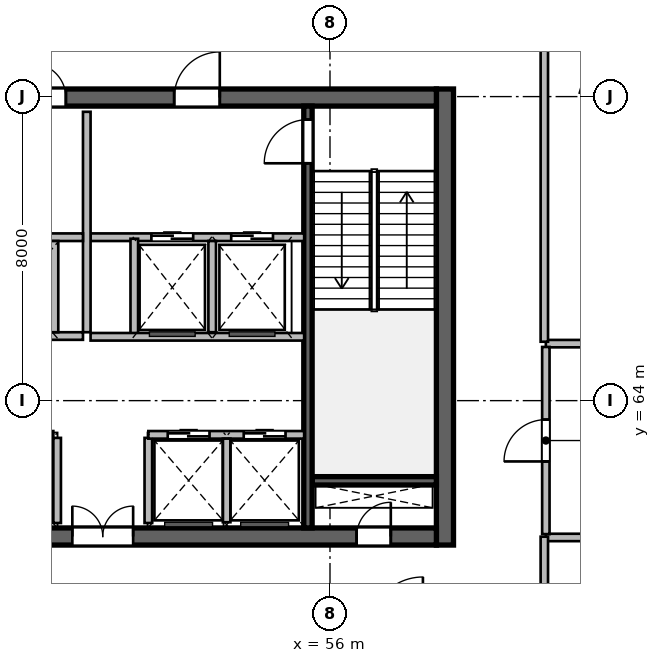
"""IFC4 building model, lengths in metres.
Left out: names, types, materials, properties, quantities, classifications, styles, units other than length and angle.
Written with IfcOpenShell. Run it as: python <this file> out.ifc"""

import sys

from ifc_helpers import new_model, si_unit, direction, frame, frame_2d, origin, place, context, subcontext, project, spatial, rectangle, extrude, source, transform, mapped, element, fill, save


model = new_model("IFC4")
c1 = context("Model", 3, precision=1e-05, world=origin(), true_north=direction((0.0, 1.0)))
c2 = subcontext(c1, "Body", "Model", "MODEL_VIEW")
j1 = project(units=[si_unit("LENGTHUNIT", "METRE"), si_unit("PLANEANGLEUNIT", "RADIAN")], contexts=[c1])
p1 = place(None, origin())
s1 = spatial("IfcSite", under=j1, at=p1, CompositionType="ELEMENT")
p2 = place(p1, origin())
s2 = spatial("IfcBuilding", under=s1, at=p2, CompositionType="ELEMENT")
p3 = place(p2, frame((0.0, 0.0, 199.2)))
s3 = spatial("IfcBuildingStorey", under=s2, at=p3, CompositionType="ELEMENT", Elevation=199.2)
m1 = source(origin(), c2, "Body", "SweptSolid", [
    extrude(rectangle(XDim=12.0, YDim=0.45, at=frame_2d((6.0, 0.0))), origin(), (0.0, 0.0, 1.0), 4.8),
])
p4 = place(p3, frame((59.025, 60.2, 0.0), z_axis=(0.0, 0.0, 1.0), x_axis=(0.0, 1.0, 0.0)))
e1 = element("IfcWall", 1, at=p4, inside=s3, PredefinedType="SHEAR", context=c2, shape_type="MappedRepresentation", body=[
    mapped(m1, transform((0.0, 0.0, 0.0), scale=1.0)),
])
m2 = source(origin(), c2, "Body", "SweptSolid", [
    extrude(rectangle(XDim=21.6, YDim=0.45, at=frame_2d((10.8, 0.0))), origin(), (0.0, 0.0, 1.0), 4.8),
])
p5 = place(p3, frame((37.2, 60.425, 0.0), z_axis=(0.0, 0.0, 1.0), x_axis=(1.0, 0.0, 0.0)))
e2 = element("IfcWall", 2, at=p5, inside=s3, PredefinedType="SHEAR", context=c2, shape_type="MappedRepresentation", body=[
    mapped(m2, transform((0.0, 0.0, 0.0), scale=1.0)),
])
p6 = place(p5, frame((1.1, 0.0, 0.0)))
e3 = element("IfcOpeningElement", 3, at=p6, cuts=e2, PredefinedType="OPENING", context=c2, shape_type="SweptSolid", body=[
    extrude(rectangle(XDim=1.15, YDim=2.15, at=frame_2d((0.575, 1.075))), frame((0.0, 0.235, 0.0), z_axis=(0.0, -1.0, 0.0), x_axis=(1.0, 0.0, 0.0)), (0.0, 0.0, 1.0), 0.47),
])
p7 = place(p5, frame((19.5, 0.0, 0.0)))
e4 = element("IfcOpeningElement", 4, at=p7, cuts=e2, PredefinedType="OPENING", context=c2, shape_type="SweptSolid", body=[
    extrude(rectangle(XDim=0.9, YDim=2.1, at=frame_2d((0.45, 1.05))), frame((0.0, 0.235, 0.0), z_axis=(0.0, -1.0, 0.0), x_axis=(1.0, 0.0, 0.0)), (0.0, 0.0, 1.0), 0.47),
])
p8 = place(p5, frame((12.02, 0.0, 0.0)))
e5 = element("IfcOpeningElement", 5, at=p8, cuts=e2, PredefinedType="OPENING", context=c2, shape_type="SweptSolid", body=[
    extrude(rectangle(XDim=1.6, YDim=2.15, at=frame_2d((0.8, 1.075))), frame((0.0, 0.235, 0.0), z_axis=(0.0, -1.0, 0.0), x_axis=(1.0, 0.0, 0.0)), (0.0, 0.0, 1.0), 0.47),
])
p9 = place(p3, frame((37.2, 71.975, 0.0), z_axis=(0.0, 0.0, 1.0), x_axis=(1.0, 0.0, 0.0)))
e6 = element("IfcWall", 6, at=p9, inside=s3, PredefinedType="SHEAR", context=c2, shape_type="MappedRepresentation", body=[
    mapped(m2, transform((0.0, 0.0, 0.0), scale=1.0)),
])
p10 = place(p9, frame((1.2, 0.0, 0.0)))
e7 = element("IfcOpeningElement", 7, at=p10, cuts=e6, PredefinedType="OPENING", context=c2, shape_type="SweptSolid", body=[
    extrude(rectangle(XDim=0.9, YDim=2.1, at=frame_2d((0.45, 1.05))), frame((0.0, 0.235, 0.0), z_axis=(0.0, -1.0, 0.0), x_axis=(1.0, 0.0, 0.0)), (0.0, 0.0, 1.0), 0.47),
])
p11 = place(p9, frame((14.7, 0.0, 0.0)))
e8 = element("IfcOpeningElement", 8, at=p11, cuts=e6, PredefinedType="OPENING", context=c2, shape_type="SweptSolid", body=[
    extrude(rectangle(XDim=1.2, YDim=2.15, at=frame_2d((0.6, 1.075))), frame((0.0, 0.235, 0.0), z_axis=(0.0, -1.0, 0.0), x_axis=(1.0, 0.0, 0.0)), (0.0, 0.0, 1.0), 0.47),
])
p12 = place(p9, frame((4.15, 0.0, 0.0)))
e9 = element("IfcOpeningElement", 9, at=p12, cuts=e6, PredefinedType="OPENING", context=c2, shape_type="SweptSolid", body=[
    extrude(rectangle(XDim=1.3, YDim=2.15, at=frame_2d((0.65, 1.075))), frame((0.0, 0.235, 0.0), z_axis=(0.0, -1.0, 0.0), x_axis=(1.0, 0.0, 0.0)), (0.0, 0.0, 1.0), 0.47),
])
p13 = place(p9, frame((7.25, 0.0, 0.0)))
e10 = element("IfcOpeningElement", 10, at=p13, cuts=e6, PredefinedType="OPENING", context=c2, shape_type="SweptSolid", body=[
    extrude(rectangle(XDim=0.9, YDim=2.1, at=frame_2d((0.45, 1.05))), frame((0.0, 0.235, 0.0), z_axis=(0.0, -1.0, 0.0), x_axis=(1.0, 0.0, 0.0)), (0.0, 0.0, 1.0), 0.47),
])
p14 = place(p9, frame((10.95, 0.0, 0.0)))
e11 = element("IfcOpeningElement", 11, at=p14, cuts=e6, PredefinedType="OPENING", context=c2, shape_type="SweptSolid", body=[
    extrude(rectangle(XDim=0.9, YDim=2.1, at=frame_2d((0.45, 1.05))), frame((0.0, 0.235, 0.0), z_axis=(0.0, -1.0, 0.0), x_axis=(1.0, 0.0, 0.0)), (0.0, 0.0, 1.0), 0.47),
])
m3 = source(origin(), c2, "Body", "SweptSolid", [
    extrude(rectangle(XDim=3.27, YDim=0.22, at=frame_2d((1.635, 0.0))), origin(), (0.0, 0.0, 1.0), 4.8),
])
p15 = place(p3, frame((55.53, 61.89, 0.0), z_axis=(0.0, 0.0, 1.0), x_axis=(1.0, 0.0, 0.0)))
e12 = element("IfcWall", 12, at=p15, inside=s3, PredefinedType="SHEAR", context=c2, shape_type="MappedRepresentation", body=[
    mapped(m3, transform((0.0, 0.0, 0.0), scale=1.0)),
])
m4 = source(origin(), c2, "Body", "SweptSolid", [
    extrude(rectangle(XDim=11.1, YDim=0.22, at=frame_2d((5.55, 0.0))), origin(), (0.0, 0.0, 1.0), 4.8),
])
p16 = place(p3, frame((55.42, 60.65, 0.0), z_axis=(0.0, 0.0, 1.0), x_axis=(0.0, 1.0, 0.0)))
e13 = element("IfcWall", 13, at=p16, inside=s3, PredefinedType="SHEAR", context=c2, shape_type="MappedRepresentation", body=[
    mapped(m4, transform((0.0, 0.0, 0.0), scale=1.0)),
])
p17 = place(p16, frame((9.595, 0.0, 0.0)))
e14 = element("IfcOpeningElement", 14, at=p17, cuts=e13, PredefinedType="OPENING", context=c2, shape_type="SweptSolid", body=[
    extrude(rectangle(XDim=1.15, YDim=2.15, at=frame_2d((0.575, 1.075))), frame((0.0, 0.12, 0.0), z_axis=(0.0, -1.0, 0.0), x_axis=(1.0, 0.0, 0.0)), (0.0, 0.0, 1.0), 0.24),
])
m5 = source(origin(), c2, "Body", "SweptSolid", [
    extrude(rectangle(XDim=2.24, YDim=0.2, at=frame_2d((1.12, 0.0))), origin(), (0.0, 0.0, 1.0), 4.54),
])
for number, where, z_axis, x_axis in (
    (15, (48.82, 60.78, 0.0), (0.0, 0.0, 1.0), (0.0, 1.0, 0.0)),
    (16, (51.22, 60.78, 0.0), (0.0, 0.0, 1.0), (0.0, 1.0, 0.0)),
):
    element("IfcWall", number, at=place(p3, frame(where, z_axis=z_axis, x_axis=x_axis)), inside=s3, PredefinedType="SOLIDWALL", context=c2, shape_type="MappedRepresentation", body=[
        mapped(m5, transform((0.0, 0.0, 0.0), scale=1.0)),
    ])
m6 = source(origin(), c2, "Body", "SweptSolid", [
    extrude(rectangle(XDim=5.62, YDim=0.2, at=frame_2d((2.81, 0.0))), origin(), (0.0, 0.0, 1.0), 4.54),
])
p18 = place(p3, frame((49.7, 68.3, 0.0), z_axis=(0.0, 0.0, 1.0), x_axis=(1.0, 0.0, 0.0)))
e17 = element("IfcWall", 17, at=p18, inside=s3, PredefinedType="SOLIDWALL", context=c2, shape_type="MappedRepresentation", body=[
    mapped(m6, transform((0.0, 0.0, 0.0), scale=1.0)),
])
p19 = place(p18, frame((1.6, 0.0, 0.0)))
e18 = element("IfcOpeningElement", 18, at=p19, cuts=e17, PredefinedType="OPENING", context=c2, shape_type="SweptSolid", body=[
    extrude(rectangle(XDim=1.1, YDim=2.15, at=frame_2d((0.55, 1.075))), frame((0.0, 0.11, 0.0), z_axis=(0.0, -1.0, 0.0), x_axis=(1.0, 0.0, 0.0)), (0.0, 0.0, 1.0), 0.22),
])
p20 = place(p18, frame((3.7, 0.0, 0.0)))
e19 = element("IfcOpeningElement", 19, at=p20, cuts=e17, PredefinedType="OPENING", context=c2, shape_type="SweptSolid", body=[
    extrude(rectangle(XDim=1.1, YDim=2.15, at=frame_2d((0.55, 1.075))), frame((0.0, 0.11, 0.0), z_axis=(0.0, -1.0, 0.0), x_axis=(1.0, 0.0, 0.0)), (0.0, 0.0, 1.0), 0.22),
])
m7 = source(origin(), c2, "Body", "SweptSolid", [
    extrude(rectangle(XDim=5.8, YDim=0.2, at=frame_2d((2.9, 0.0))), origin(), (0.0, 0.0, 1.0), 4.54),
])
p21 = place(p3, frame((49.6, 65.8, 0.0), z_axis=(0.0, 0.0, 1.0), x_axis=(0.0, 1.0, 0.0)))
e20 = element("IfcWall", 20, at=p21, inside=s3, PredefinedType="SOLIDWALL", context=c2, shape_type="MappedRepresentation", body=[
    mapped(m7, transform((0.0, 0.0, 0.0), scale=1.0)),
])
m8 = source(origin(), c2, "Body", "SweptSolid", [
    extrude(rectangle(XDim=2.58, YDim=0.2, at=frame_2d((1.29, 0.0))), origin(), (0.0, 0.0, 1.0), 4.54),
])
p22 = place(p3, frame((50.85, 65.68, 0.0), z_axis=(0.0, 0.0, 1.0), x_axis=(0.0, 1.0, 0.0)))
e21 = element("IfcWall", 21, at=p22, inside=s3, PredefinedType="SOLIDWALL", context=c2, shape_type="MappedRepresentation", body=[
    mapped(m8, transform((0.0, 0.0, 0.0), scale=1.0)),
])
m9 = source(origin(), c2, "Body", "SweptSolid", [
    extrude(rectangle(XDim=2.4, YDim=0.2, at=frame_2d((1.2, 0.0))), origin(), (0.0, 0.0, 1.0), 4.54),
])
p23 = place(p3, frame((52.9, 65.8, 0.0), z_axis=(0.0, 0.0, 1.0), x_axis=(0.0, 1.0, 0.0)))
e22 = element("IfcWall", 22, at=p23, inside=s3, PredefinedType="SOLIDWALL", context=c2, shape_type="MappedRepresentation", body=[
    mapped(m9, transform((0.0, 0.0, 0.0), scale=1.0)),
])
p24 = place(p3, frame((49.7, 65.68, 0.0), z_axis=(0.0, 0.0, 1.0), x_axis=(1.0, 0.0, 0.0)))
e23 = element("IfcWall", 23, at=p24, inside=s3, PredefinedType="SOLIDWALL", context=c2, shape_type="MappedRepresentation", body=[
    mapped(m6, transform((0.0, 0.0, 0.0), scale=1.0)),
])
m10 = source(origin(), c2, "Body", "SweptSolid", [
    extrude(rectangle(XDim=8.8, YDim=0.2, at=frame_2d((4.4, 0.0))), origin(), (0.0, 0.0, 1.0), 4.54),
])
p25 = place(p3, frame((40.7, 68.3, 0.0), z_axis=(0.0, 0.0, 1.0), x_axis=(1.0, 0.0, 0.0)))
e24 = element("IfcWall", 24, at=p25, inside=s3, PredefinedType="SOLIDWALL", context=c2, shape_type="MappedRepresentation", body=[
    mapped(m10, transform((0.0, 0.0, 0.0), scale=1.0)),
])
m11 = source(origin(), c2, "Body", "SweptSolid", [
    extrude(rectangle(XDim=8.02, YDim=0.2, at=frame_2d((4.01, 0.0))), origin(), (0.0, 0.0, 1.0), 4.54),
])
p26 = place(p3, frame((40.7, 63.1, 0.0), z_axis=(0.0, 0.0, 1.0), x_axis=(1.0, 0.0, 0.0)))
e25 = element("IfcWall", 25, at=p26, inside=s3, PredefinedType="SOLIDWALL", context=c2, shape_type="MappedRepresentation", body=[
    mapped(m11, transform((0.0, 0.0, 0.0), scale=1.0)),
])
p27 = place(p26, frame((0.72, 0.0, 0.0)))
e26 = element("IfcOpeningElement", 26, at=p27, cuts=e25, PredefinedType="OPENING", context=c2, shape_type="SweptSolid", body=[
    extrude(rectangle(XDim=1.0, YDim=2.15, at=frame_2d((0.5, 1.075))), frame((0.0, 0.11, 0.0), z_axis=(0.0, -1.0, 0.0), x_axis=(1.0, 0.0, 0.0)), (0.0, 0.0, 1.0), 0.22),
])
p28 = place(p26, frame((2.62, 0.0, 0.0)))
e27 = element("IfcOpeningElement", 27, at=p28, cuts=e25, PredefinedType="OPENING", context=c2, shape_type="SweptSolid", body=[
    extrude(rectangle(XDim=1.0, YDim=2.15, at=frame_2d((0.5, 1.075))), frame((0.0, 0.11, 0.0), z_axis=(0.0, -1.0, 0.0), x_axis=(1.0, 0.0, 0.0)), (0.0, 0.0, 1.0), 0.22),
])
p29 = place(p26, frame((4.55, 0.0, 0.0)))
e28 = element("IfcOpeningElement", 28, at=p29, cuts=e25, PredefinedType="OPENING", context=c2, shape_type="SweptSolid", body=[
    extrude(rectangle(XDim=1.0, YDim=2.15, at=frame_2d((0.5, 1.075))), frame((0.0, 0.11, 0.0), z_axis=(0.0, -1.0, 0.0), x_axis=(1.0, 0.0, 0.0)), (0.0, 0.0, 1.0), 0.22),
])
p30 = place(p26, frame((6.55, 0.0, 0.0)))
e29 = element("IfcOpeningElement", 29, at=p30, cuts=e25, PredefinedType="OPENING", context=c2, shape_type="SweptSolid", body=[
    extrude(rectangle(XDim=1.0, YDim=2.15, at=frame_2d((0.5, 1.075))), frame((0.0, 0.11, 0.0), z_axis=(0.0, -1.0, 0.0), x_axis=(1.0, 0.0, 0.0)), (0.0, 0.0, 1.0), 0.22),
])
m12 = source(origin(), c2, "Body", "SweptSolid", [
    extrude(rectangle(XDim=4.1, YDim=0.2, at=frame_2d((2.05, 0.0))), origin(), (0.0, 0.0, 1.0), 4.54),
])
p31 = place(p3, frame((51.22, 63.1, 0.0), z_axis=(0.0, 0.0, 1.0), x_axis=(1.0, 0.0, 0.0)))
e30 = element("IfcWall", 30, at=p31, inside=s3, PredefinedType="SOLIDWALL", context=c2, shape_type="MappedRepresentation", body=[
    mapped(m12, transform((0.0, 0.0, 0.0), scale=1.0)),
])
p32 = place(p31, frame((0.51, 0.0, 0.0)))
e31 = element("IfcOpeningElement", 31, at=p32, cuts=e30, PredefinedType="OPENING", context=c2, shape_type="SweptSolid", body=[
    extrude(rectangle(XDim=1.1, YDim=2.15, at=frame_2d((0.55, 1.075))), frame((0.0, 0.11, 0.0), z_axis=(0.0, -1.0, 0.0), x_axis=(1.0, 0.0, 0.0)), (0.0, 0.0, 1.0), 0.22),
])
p33 = place(p31, frame((2.51, 0.0, 0.0)))
e32 = element("IfcOpeningElement", 32, at=p33, cuts=e30, PredefinedType="OPENING", context=c2, shape_type="SweptSolid", body=[
    extrude(rectangle(XDim=1.1, YDim=2.15, at=frame_2d((0.55, 1.075))), frame((0.0, 0.11, 0.0), z_axis=(0.0, -1.0, 0.0), x_axis=(1.0, 0.0, 0.0)), (0.0, 0.0, 1.0), 0.22),
])
m13 = source(origin(), c2, "Body", "SweptSolid", [
    extrude(rectangle(XDim=2.2, YDim=0.2, at=frame_2d((1.1, 0.0))), origin(), (0.0, 0.0, 1.0), 4.54),
])
p34 = place(p3, frame((53.28, 60.8, 0.0), z_axis=(0.0, 0.0, 1.0), x_axis=(0.0, 1.0, 0.0)))
e33 = element("IfcWall", 33, at=p34, inside=s3, PredefinedType="SOLIDWALL", context=c2, shape_type="MappedRepresentation", body=[
    mapped(m13, transform((0.0, 0.0, 0.0), scale=1.0)),
])
p35 = place(p3, frame((40.7, 65.7, 0.0), z_axis=(0.0, 0.0, 1.0), x_axis=(1.0, 0.0, 0.0)))
e34 = element("IfcWall", 34, at=p35, inside=s3, PredefinedType="SOLIDWALL", context=c2, shape_type="MappedRepresentation", body=[
    mapped(m10, transform((0.0, 0.0, 0.0), scale=1.0)),
])
p36 = place(p35, frame((0.72, 0.0, 0.0)))
e35 = element("IfcOpeningElement", 35, at=p36, cuts=e34, PredefinedType="OPENING", context=c2, shape_type="SweptSolid", body=[
    extrude(rectangle(XDim=1.0, YDim=2.15, at=frame_2d((0.5, 1.075))), frame((0.0, 0.11, 0.0), z_axis=(0.0, -1.0, 0.0), x_axis=(1.0, 0.0, 0.0)), (0.0, 0.0, 1.0), 0.22),
])
p37 = place(p35, frame((2.62, 0.0, 0.0)))
e36 = element("IfcOpeningElement", 36, at=p37, cuts=e34, PredefinedType="OPENING", context=c2, shape_type="SweptSolid", body=[
    extrude(rectangle(XDim=1.0, YDim=2.15, at=frame_2d((0.5, 1.075))), frame((0.0, 0.11, 0.0), z_axis=(0.0, -1.0, 0.0), x_axis=(1.0, 0.0, 0.0)), (0.0, 0.0, 1.0), 0.22),
])
p38 = place(p35, frame((4.55, 0.0, 0.0)))
e37 = element("IfcOpeningElement", 37, at=p38, cuts=e34, PredefinedType="OPENING", context=c2, shape_type="SweptSolid", body=[
    extrude(rectangle(XDim=1.0, YDim=2.15, at=frame_2d((0.5, 1.075))), frame((0.0, 0.11, 0.0), z_axis=(0.0, -1.0, 0.0), x_axis=(1.0, 0.0, 0.0)), (0.0, 0.0, 1.0), 0.22),
])
p39 = place(p35, frame((6.55, 0.0, 0.0)))
e38 = element("IfcOpeningElement", 38, at=p39, cuts=e34, PredefinedType="OPENING", context=c2, shape_type="SweptSolid", body=[
    extrude(rectangle(XDim=1.0, YDim=2.15, at=frame_2d((0.5, 1.075))), frame((0.0, 0.11, 0.0), z_axis=(0.0, -1.0, 0.0), x_axis=(1.0, 0.0, 0.0)), (0.0, 0.0, 1.0), 0.22),
])
p40 = place(p3, frame((48.75, 65.8, 0.0), z_axis=(0.0, 0.0, 1.0), x_axis=(0.0, 1.0, 0.0)))
e39 = element("IfcWall", 39, at=p40, inside=s3, PredefinedType="SOLIDWALL", context=c2, shape_type="MappedRepresentation", body=[
    mapped(m9, transform((0.0, 0.0, 0.0), scale=1.0)),
])
m14 = source(origin(), c2, "Body", "SweptSolid", [
    extrude(rectangle(XDim=6.82, YDim=0.195, at=frame_2d((3.41, 0.0))), origin(), (0.0, 0.0, 1.0), 4.54),
])
for number, where, z_axis, x_axis in (
    (40, (61.68, 60.4, 0.0), (0.0, 0.0, 1.0), (1.0, 0.0, 0.0)),
    (41, (61.68, 65.5, 0.0), (0.0, 0.0, 1.0), (1.0, 0.0, 0.0)),
):
    element("IfcWall", number, at=place(p3, frame(where, z_axis=z_axis, x_axis=x_axis)), inside=s3, PredefinedType="PARTITIONING", context=c2, shape_type="MappedRepresentation", body=[
        mapped(m14, transform((0.0, 0.0, 0.0), scale=1.0)),
    ])
m15 = source(origin(), c2, "Body", "SweptSolid", [
    extrude(rectangle(XDim=4.925, YDim=0.195, at=frame_2d((2.462, 0.0))), origin(), (0.0, 0.0, 1.0), 4.54),
])
p41 = place(p3, frame((61.68, 60.488, 0.0), z_axis=(0.0, 0.0, 1.0), x_axis=(0.0, 1.0, 0.0)))
e42 = element("IfcWall", 42, at=p41, inside=s3, PredefinedType="PARTITIONING", context=c2, shape_type="MappedRepresentation", body=[
    mapped(m15, transform((0.0, 0.0, 0.0), scale=1.0)),
])
p42 = place(p41, frame((1.912, 0.0, 0.0)))
e43 = element("IfcOpeningElement", 43, at=p42, cuts=e42, PredefinedType="OPENING", context=c2, shape_type="SweptSolid", body=[
    extrude(rectangle(XDim=1.1, YDim=2.15, at=frame_2d((0.55, 1.075))), frame((0.0, 0.107, 0.0), z_axis=(0.0, -1.0, 0.0), x_axis=(1.0, 0.0, 0.0)), (0.0, 0.0, 1.0), 0.215),
])
m16 = source(origin(), c2, "Body", "SweptSolid", [
    extrude(rectangle(XDim=2.46, YDim=0.195, at=frame_2d((1.23, 0.0))), origin(), (0.0, 0.0, 1.0), 4.54),
])
p43 = place(p3, frame((61.64, 57.96, 0.0), z_axis=(0.0, 0.0, 1.0), x_axis=(0.0, 1.0, 0.0)))
e44 = element("IfcWall", 44, at=p43, inside=s3, PredefinedType="PARTITIONING", context=c2, shape_type="MappedRepresentation", body=[
    mapped(m16, transform((0.0, 0.0, 0.0), scale=1.0)),
])
m17 = source(origin(), c2, "Body", "SweptSolid", [
    extrude(rectangle(XDim=11.619, YDim=0.195, at=frame_2d((5.809, 0.0))), origin(), (0.0, 0.0, 1.0), 4.54),
])
p44 = place(p3, frame((61.64, 65.55, 0.0), z_axis=(0.0, 0.0, 1.0), x_axis=(0.0, 1.0, 0.0)))
e45 = element("IfcWall", 45, at=p44, inside=s3, PredefinedType="PARTITIONING", context=c2, shape_type="MappedRepresentation", body=[
    mapped(m17, transform((0.0, 0.0, 0.0), scale=1.0)),
])
m18 = source(origin(), c2, "Body", "SweptSolid", [
    extrude(rectangle(XDim=0.9, YDim=2.1, at=frame_2d((0.45, 1.05))), frame((0.0, 0.025, 0.0), z_axis=(0.0, -1.0, 0.0), x_axis=(1.0, 0.0, 0.0)), (0.0, 0.0, 1.0), 0.05),
])
p45 = place(p7, origin())
e46 = element("IfcDoor", 46, at=p45, inside=s3, OperationType="SINGLE_SWING_RIGHT", PredefinedType="DOOR", context=c2, shape_type="MappedRepresentation", body=[
    mapped(m18, transform((0.0, 0.0, 0.0), scale=1.0)),
])
fill(e4, e46)
m19 = source(origin(), c2, "Body", "SweptSolid", [
    extrude(rectangle(XDim=1.15, YDim=2.15, at=frame_2d((0.575, 1.075))), frame((0.0, 0.025, 0.0), z_axis=(0.0, -1.0, 0.0), x_axis=(1.0, 0.0, 0.0)), (0.0, 0.0, 1.0), 0.05),
])
p46 = place(p17, origin())
e47 = element("IfcDoor", 47, at=p46, inside=s3, OperationType="SINGLE_SWING_LEFT", PredefinedType="DOOR", context=c2, shape_type="MappedRepresentation", body=[
    mapped(m19, transform((0.0, 0.0, 0.0), scale=1.0)),
])
fill(e14, e47)
m20 = source(origin(), c2, "Body", "SweptSolid", [
    extrude(rectangle(XDim=1.6, YDim=2.15, at=frame_2d((0.8, 1.075))), frame((0.0, 0.025, 0.0), z_axis=(0.0, -1.0, 0.0), x_axis=(1.0, 0.0, 0.0)), (0.0, 0.0, 1.0), 0.05),
])
p47 = place(p8, origin())
e48 = element("IfcDoor", 48, at=p47, inside=s3, OperationType="DOUBLE_DOOR_SINGLE_SWING", PredefinedType="DOOR", context=c2, shape_type="MappedRepresentation", body=[
    mapped(m20, transform((0.0, 0.0, 0.0), scale=1.0)),
])
fill(e5, e48)
m21 = source(origin(), c2, "Body", "SweptSolid", [
    extrude(rectangle(XDim=1.2, YDim=2.15, at=frame_2d((0.6, 1.075))), frame((0.0, 0.025, 0.0), z_axis=(0.0, -1.0, 0.0), x_axis=(1.0, 0.0, 0.0)), (0.0, 0.0, 1.0), 0.05),
])
p48 = place(p11, origin())
e49 = element("IfcDoor", 49, at=p48, inside=s3, OperationType="SINGLE_SWING_RIGHT", PredefinedType="DOOR", context=c2, shape_type="MappedRepresentation", body=[
    mapped(m21, transform((0.0, 0.0, 0.0), scale=1.0)),
])
fill(e8, e49)
m22 = source(origin(), c2, "Body", "SweptSolid", [
    extrude(rectangle(XDim=1.1, YDim=2.15, at=frame_2d((0.55, 1.075))), frame((0.0, 0.025, 0.0), z_axis=(0.0, -1.0, 0.0), x_axis=(1.0, 0.0, 0.0)), (0.0, 0.0, 1.0), 0.05),
])
p49 = place(p19, origin())
e50 = element("IfcDoor", 50, at=p49, inside=s3, OperationType="DOUBLE_DOOR_SLIDING", PredefinedType="DOOR", context=c2, shape_type="MappedRepresentation", body=[
    mapped(m22, transform((0.0, 0.0, 0.0), scale=1.0)),
])
fill(e18, e50)
p50 = place(p20, origin())
e51 = element("IfcDoor", 51, at=p50, inside=s3, OperationType="DOUBLE_DOOR_SLIDING", PredefinedType="DOOR", context=c2, shape_type="MappedRepresentation", body=[
    mapped(m22, transform((0.0, 0.0, 0.0), scale=1.0)),
])
fill(e19, e51)
p51 = place(p14, origin())
e52 = element("IfcDoor", 52, at=p51, inside=s3, OperationType="SINGLE_SWING_LEFT", PredefinedType="DOOR", context=c2, shape_type="MappedRepresentation", body=[
    mapped(m18, transform((0.0, 0.0, 0.0), scale=1.0)),
])
fill(e11, e52)
m23 = source(origin(), c2, "Body", "SweptSolid", [
    extrude(rectangle(XDim=1.1, YDim=2.15, at=frame_2d((0.55, 1.075))), frame((0.0, 0.025, 0.0), z_axis=(0.0, -1.0, 0.0), x_axis=(1.0, 0.0, 0.0)), (0.0, 0.0, 1.0), 0.05),
])
p52 = place(p32, origin())
e53 = element("IfcDoor", 53, at=p52, inside=s3, OperationType="DOUBLE_DOOR_SLIDING", PredefinedType="DOOR", context=c2, shape_type="MappedRepresentation", body=[
    mapped(m23, transform((0.0, 0.0, 0.0), scale=1.0)),
])
fill(e31, e53)
p53 = place(p33, origin())
e54 = element("IfcDoor", 54, at=p53, inside=s3, OperationType="DOUBLE_DOOR_SLIDING", PredefinedType="DOOR", context=c2, shape_type="MappedRepresentation", body=[
    mapped(m23, transform((0.0, 0.0, 0.0), scale=1.0)),
])
fill(e32, e54)
m24 = source(origin(), c2, "Body", "SweptSolid", [
    extrude(rectangle(XDim=1.1, YDim=2.15, at=frame_2d((0.55, 1.075))), frame((0.0, 0.025, 0.0), z_axis=(0.0, -1.0, 0.0), x_axis=(1.0, 0.0, 0.0)), (0.0, 0.0, 1.0), 0.05),
])
p54 = place(p42, origin())
e55 = element("IfcDoor", 55, at=p54, inside=s3, OperationType="SINGLE_SWING_LEFT", PredefinedType="DOOR", context=c2, shape_type="MappedRepresentation", body=[
    mapped(m24, transform((0.0, 0.0, 0.0), scale=1.0)),
])
fill(e43, e55)
save(model, sys.argv[1])
